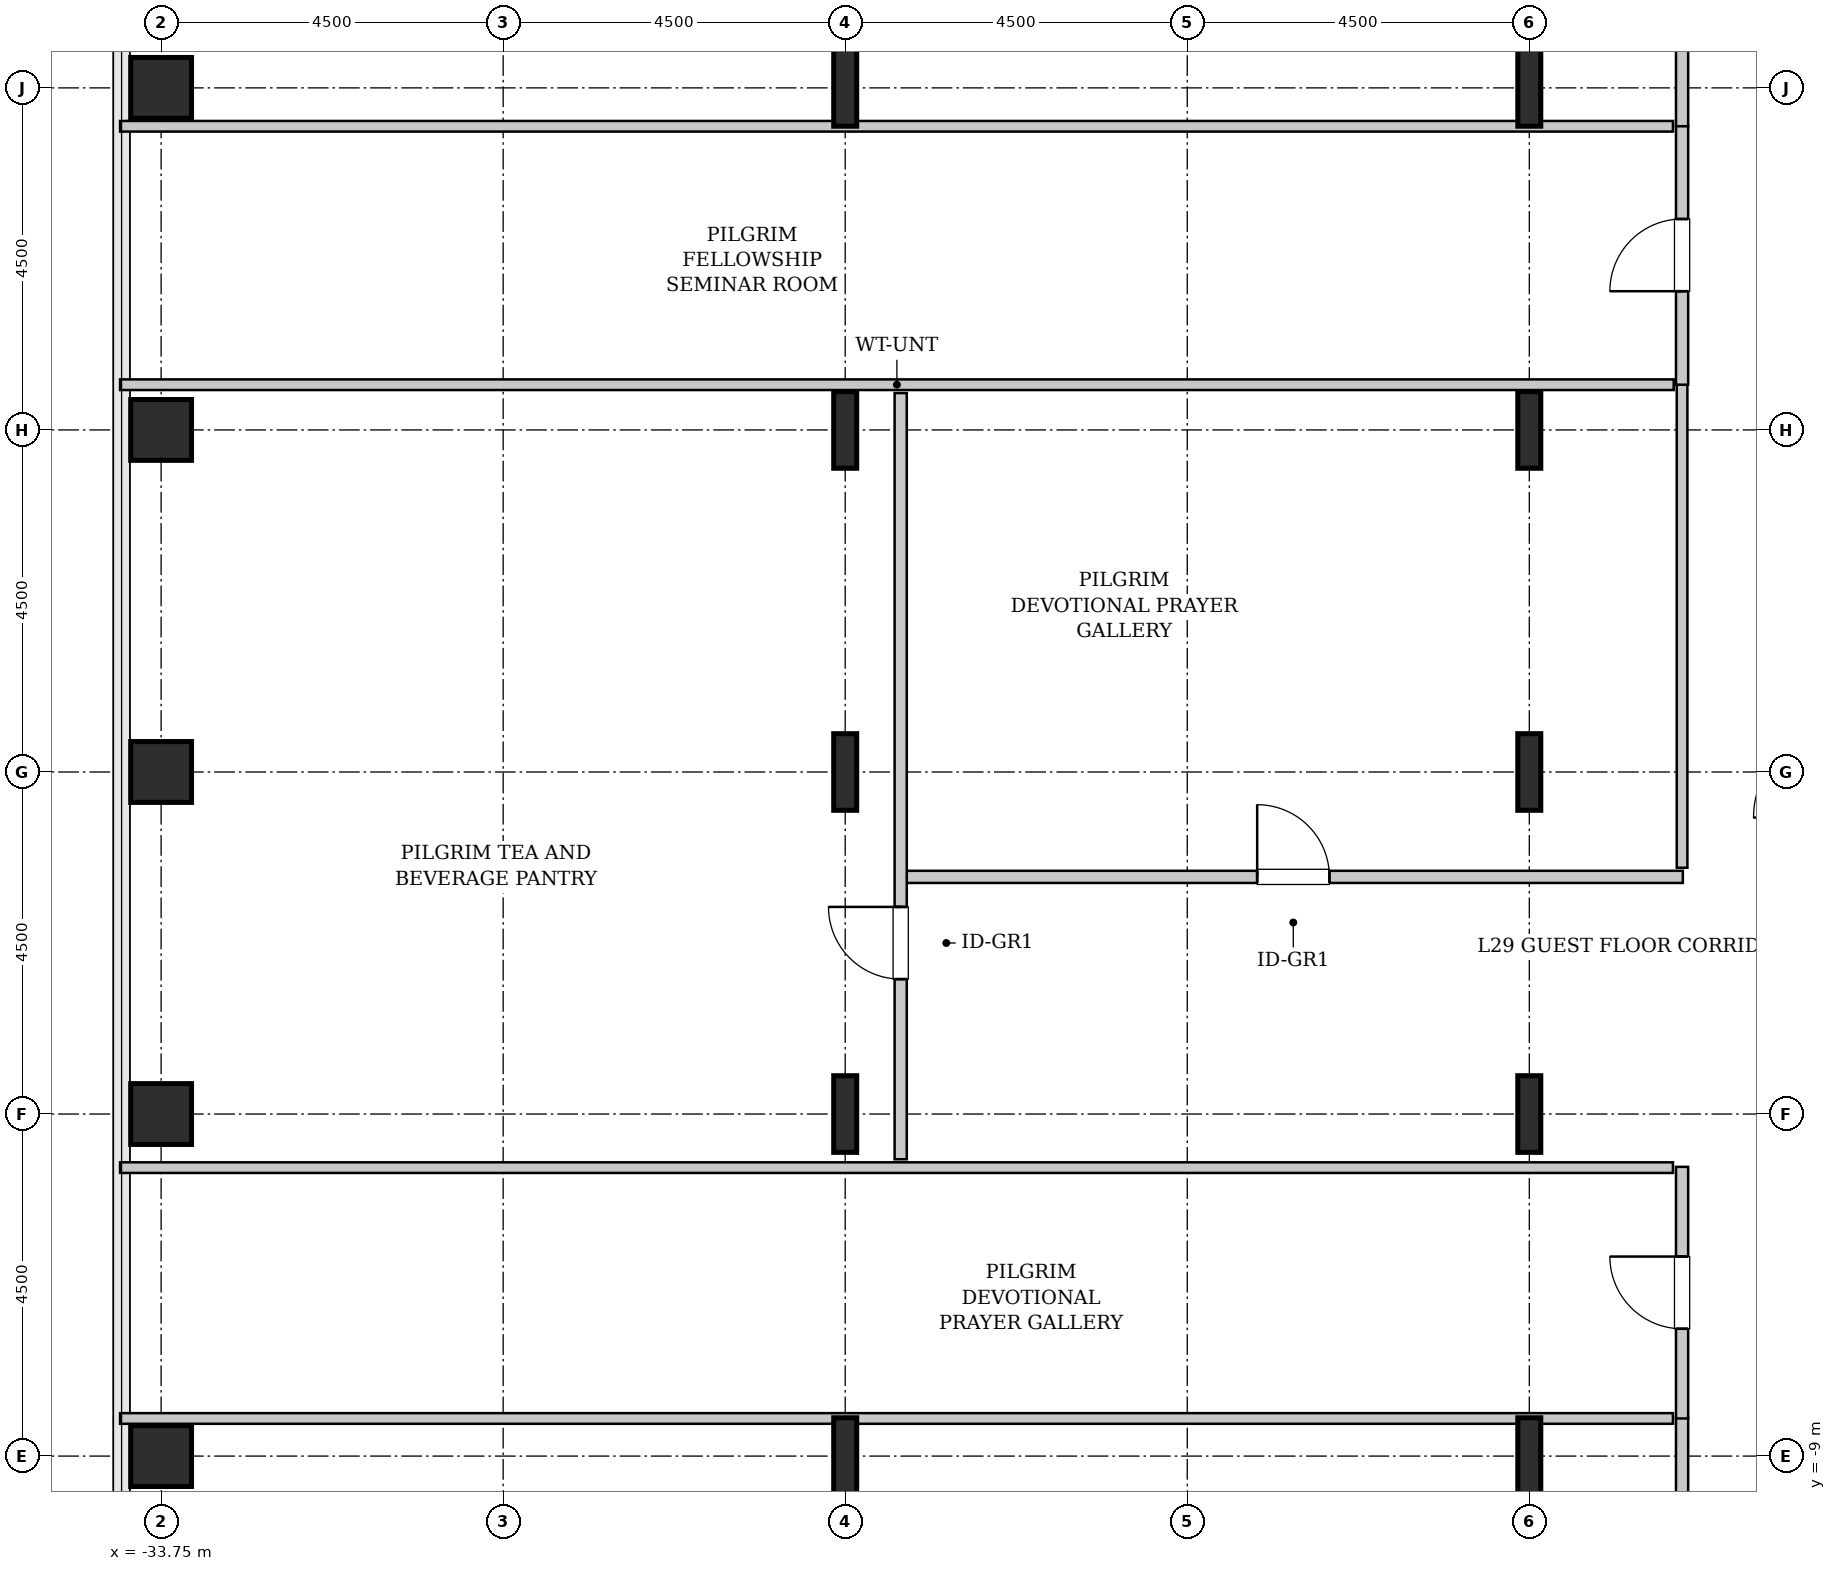
"""IFC4 building model, lengths in metres.
Left out: names, types, materials, properties, quantities, classifications, styles, units other than length and angle.
Written with IfcOpenShell. Run it as: python <this file> out.ifc"""

import sys

from ifc_helpers import new_model, si_unit, direction, frame, frame_2d, origin, origin_2d, place, context, subcontext, project, spatial, rectangle, hollow_rectangle, i_section, extrude, source, transform, mapped, element, fill, save


model = new_model("IFC4")
c1 = context("Model", 3, precision=1e-05, world=origin(), true_north=direction((0.0, 1.0)))
c2 = subcontext(c1, "Body", "Model", "MODEL_VIEW")
j1 = project(units=[si_unit("LENGTHUNIT", "METRE"), si_unit("PLANEANGLEUNIT", "RADIAN")], contexts=[c1])
p1 = place(None, origin())
s1 = spatial("IfcSite", under=j1, at=p1, CompositionType="ELEMENT")
p2 = place(p1, origin())
s2 = spatial("IfcBuilding", under=s1, at=p2, CompositionType="ELEMENT")
p3 = place(p2, frame((0.0, 0.0, 121.2)))
s3 = spatial("IfcBuildingStorey", under=s2, at=p3, CompositionType="ELEMENT", Elevation=121.2)
m1 = source(origin(), c2, "Body", "SweptSolid", [
    extrude(hollow_rectangle(XDim=0.8, YDim=0.8, WallThickness=0.04, InnerFilletRadius=0.04, OuterFilletRadius=0.08, at=origin_2d()), origin(), (0.0, 0.0, 1.0), 3.8),
])
for number, where, z_axis, x_axis in (
    (1, (-33.75, -9.0, 0.0), (0.0, 0.0, 1.0), (1.0, 0.0, 0.0)),
    (2, (-33.75, -4.5, 0.0), (0.0, 0.0, 1.0), (1.0, 0.0, 0.0)),
    (3, (-33.75, 0.0, 0.0), (0.0, 0.0, 1.0), (1.0, 0.0, 0.0)),
    (4, (-33.75, 4.5, 0.0), (0.0, 0.0, 1.0), (1.0, 0.0, 0.0)),
    (5, (-33.75, 9.0, 0.0), (0.0, 0.0, 1.0), (1.0, 0.0, 0.0)),
):
    element("IfcColumn", number, at=place(p3, frame(where, z_axis=z_axis, x_axis=x_axis)), inside=s3, PredefinedType="COLUMN", context=c2, shape_type="MappedRepresentation", body=[
        mapped(m1, transform((0.0, 0.0, 0.0), x_axis=(1.0, 0.0, 0.0), y_axis=(0.0, 1.0, 0.0), z_axis=(0.0, 0.0, 1.0), scale=1.0)),
    ])
m2 = source(origin(), c2, "Body", "SweptSolid", [
    extrude(i_section(OverallWidth=0.302, OverallDepth=1.008, WebThickness=0.021, FlangeThickness=0.04, FilletRadius=0.03, at=origin_2d()), origin(), (0.0, 0.0, 1.0), 3.8),
])
for number, where, z_axis, x_axis in (
    (6, (-24.75, -9.0, 0.0), (0.0, 0.0, 1.0), (1.0, 0.0, 0.0)),
    (7, (-24.75, -4.5, 0.0), (0.0, 0.0, 1.0), (1.0, 0.0, 0.0)),
    (8, (-24.75, 0.0, 0.0), (0.0, 0.0, 1.0), (1.0, 0.0, 0.0)),
    (9, (-24.75, 4.5, 0.0), (0.0, 0.0, 1.0), (1.0, 0.0, 0.0)),
    (10, (-24.75, 9.0, 0.0), (0.0, 0.0, 1.0), (1.0, 0.0, 0.0)),
    (11, (-15.75, -9.0, 0.0), (0.0, 0.0, 1.0), (1.0, 0.0, 0.0)),
    (12, (-15.75, -4.5, 0.0), (0.0, 0.0, 1.0), (1.0, 0.0, 0.0)),
    (13, (-15.75, 0.0, 0.0), (0.0, 0.0, 1.0), (1.0, 0.0, 0.0)),
    (14, (-15.75, 4.5, 0.0), (0.0, 0.0, 1.0), (1.0, 0.0, 0.0)),
    (15, (-15.75, 9.0, 0.0), (0.0, 0.0, 1.0), (1.0, 0.0, 0.0)),
):
    element("IfcColumn", number, at=place(p3, frame(where, z_axis=z_axis, x_axis=x_axis)), inside=s3, PredefinedType="COLUMN", context=c2, shape_type="MappedRepresentation", body=[
        mapped(m2, transform((0.0, 0.0, 0.0), x_axis=(1.0, 0.0, 0.0), y_axis=(0.0, 1.0, 0.0), z_axis=(0.0, 0.0, 1.0), scale=1.0)),
    ])
m3 = source(origin(), c2, "Body", "SweptSolid", [
    extrude(rectangle(XDim=12.745, YDim=0.16, at=frame_2d((6.373, 0.0))), origin(), (0.0, 0.0, 1.0), 3.535),
])
p4 = place(p3, frame((-13.74, -21.24, 0.0), z_axis=(0.0, 0.0, 1.0), x_axis=(0.0, 1.0, 0.0)))
e16 = element("IfcWall", 16, at=p4, inside=s3, PredefinedType="PARTITIONING", context=c2, shape_type="MappedRepresentation", body=[
    mapped(m3, transform((0.0, 0.0, 0.0), x_axis=(1.0, 0.0, 0.0), y_axis=(0.0, 1.0, 0.0), z_axis=(0.0, 0.0, 1.0), scale=1.0)),
])
p5 = place(p4, frame((10.762, 0.0, 0.0)))
e17 = element("IfcOpeningElement", 17, at=p5, cuts=e16, PredefinedType="OPENING", context=c2, shape_type="SweptSolid", body=[
    extrude(rectangle(XDim=0.95, YDim=2.1, at=frame_2d((0.475, 1.05))), frame((0.0, 0.09, 0.0), z_axis=(0.0, -1.0, 0.0), x_axis=(1.0, 0.0, 0.0)), (0.0, 0.0, 1.0), 0.18),
])
m4 = source(origin(), c2, "Body", "SweptSolid", [
    extrude(rectangle(XDim=20.43, YDim=0.14, at=frame_2d((10.215, 0.0))), origin(), (0.0, 0.0, 1.0), 2.875),
])
p6 = place(p3, frame((-34.29, -8.505, 0.0), z_axis=(0.0, 0.0, 1.0), x_axis=(1.0, 0.0, 0.0)))
e18 = element("IfcWall", 18, at=p6, inside=s3, PredefinedType="PARTITIONING", context=c2, shape_type="MappedRepresentation", body=[
    mapped(m4, transform((0.0, 0.0, 0.0), x_axis=(1.0, 0.0, 0.0), y_axis=(0.0, 1.0, 0.0), z_axis=(0.0, 0.0, 1.0), scale=1.0)),
])
m5 = source(origin(), c2, "Body", "SweptSolid", [
    extrude(rectangle(XDim=3.31, YDim=0.16, at=frame_2d((1.655, 0.0))), origin(), (0.0, 0.0, 1.0), 3.535),
])
p7 = place(p3, frame((-13.74, -8.505, 0.0), z_axis=(0.0, 0.0, 1.0), x_axis=(0.0, 1.0, 0.0)))
e19 = element("IfcWall", 19, at=p7, inside=s3, PredefinedType="PARTITIONING", context=c2, shape_type="MappedRepresentation", body=[
    mapped(m5, transform((0.0, 0.0, 0.0), x_axis=(1.0, 0.0, 0.0), y_axis=(0.0, 1.0, 0.0), z_axis=(0.0, 0.0, 1.0), scale=1.0)),
])
p8 = place(p7, frame((1.18, 0.0, 0.0)))
e20 = element("IfcOpeningElement", 20, at=p8, cuts=e19, PredefinedType="OPENING", context=c2, shape_type="SweptSolid", body=[
    extrude(rectangle(XDim=0.95, YDim=2.1, at=frame_2d((0.475, 1.05))), frame((0.0, 0.09, 0.0), z_axis=(0.0, -1.0, 0.0), x_axis=(1.0, 0.0, 0.0)), (0.0, 0.0, 1.0), 0.18),
])
m6 = source(origin(), c2, "Body", "SweptSolid", [
    extrude(rectangle(XDim=20.43, YDim=0.14, at=frame_2d((10.215, 0.0))), origin(), (0.0, 0.0, 1.0), 3.535),
])
p9 = place(p3, frame((-34.29, -5.205, 0.0), z_axis=(0.0, 0.0, 1.0), x_axis=(1.0, 0.0, 0.0)))
e21 = element("IfcWall", 21, at=p9, inside=s3, PredefinedType="PARTITIONING", context=c2, shape_type="MappedRepresentation", body=[
    mapped(m6, transform((0.0, 0.0, 0.0), x_axis=(1.0, 0.0, 0.0), y_axis=(0.0, 1.0, 0.0), z_axis=(0.0, 0.0, 1.0), scale=1.0)),
])
m7 = source(origin(), c2, "Body", "SweptSolid", [
    extrude(rectangle(XDim=10.25, YDim=0.16, at=frame_2d((5.125, 0.0))), origin(), (0.0, 0.0, 1.0), 3.535),
])
p10 = place(p3, frame((-23.98, -1.38, 0.0), z_axis=(0.0, 0.0, 1.0), x_axis=(1.0, 0.0, 0.0)))
e22 = element("IfcWall", 22, at=p10, inside=s3, PredefinedType="PARTITIONING", context=c2, shape_type="MappedRepresentation", body=[
    mapped(m7, transform((0.0, 0.0, 0.0), x_axis=(1.0, 0.0, 0.0), y_axis=(0.0, 1.0, 0.0), z_axis=(0.0, 0.0, 1.0), scale=1.0)),
])
p11 = place(p10, frame((4.65, 0.0, 0.0)))
e23 = element("IfcOpeningElement", 23, at=p11, cuts=e22, PredefinedType="OPENING", context=c2, shape_type="SweptSolid", body=[
    extrude(rectangle(XDim=0.95, YDim=2.1, at=frame_2d((0.475, 1.05))), frame((0.0, 0.09, 0.0), z_axis=(0.0, -1.0, 0.0), x_axis=(1.0, 0.0, 0.0)), (0.0, 0.0, 1.0), 0.18),
])
m8 = source(origin(), c2, "Body", "SweptSolid", [
    extrude(rectangle(XDim=6.365, YDim=0.14, at=frame_2d((3.183, 0.0))), origin(), (0.0, 0.0, 1.0), 3.535),
])
p12 = place(p3, frame((-13.74, -1.26, 0.0), z_axis=(0.0, 0.0, 1.0), x_axis=(0.0, 1.0, 0.0)))
e24 = element("IfcWall", 24, at=p12, inside=s3, PredefinedType="PARTITIONING", context=c2, shape_type="MappedRepresentation", body=[
    mapped(m8, transform((0.0, 0.0, 0.0), x_axis=(1.0, 0.0, 0.0), y_axis=(0.0, 1.0, 0.0), z_axis=(0.0, 0.0, 1.0), scale=1.0)),
])
m9 = source(origin(), c2, "Body", "SweptSolid", [
    extrude(rectangle(XDim=20.44, YDim=0.14, at=frame_2d((10.22, 0.0))), origin(), (0.0, 0.0, 1.0), 3.535),
])
p13 = place(p3, frame((-34.29, 5.095, 0.0), z_axis=(0.0, 0.0, 1.0), x_axis=(1.0, 0.0, 0.0)))
e25 = element("IfcWall", 25, at=p13, inside=s3, PredefinedType="PARTITIONING", context=c2, shape_type="MappedRepresentation", body=[
    mapped(m9, transform((0.0, 0.0, 0.0), x_axis=(1.0, 0.0, 0.0), y_axis=(0.0, 1.0, 0.0), z_axis=(0.0, 0.0, 1.0), scale=1.0)),
])
m10 = source(origin(), c2, "Body", "SweptSolid", [
    extrude(rectangle(XDim=10.08, YDim=0.16, at=frame_2d((5.04, 0.0))), origin(), (0.0, 0.0, 1.0), 3.535),
])
p14 = place(p3, frame((-24.02, -5.095, 0.0), z_axis=(0.0, 0.0, 1.0), x_axis=(0.0, 1.0, 0.0)))
e26 = element("IfcWall", 26, at=p14, inside=s3, PredefinedType="PARTITIONING", context=c2, shape_type="MappedRepresentation", body=[
    mapped(m10, transform((0.0, 0.0, 0.0), x_axis=(1.0, 0.0, 0.0), y_axis=(0.0, 1.0, 0.0), z_axis=(0.0, 0.0, 1.0), scale=1.0)),
])
p15 = place(p14, frame((2.37, 0.0, 0.0)))
e27 = element("IfcOpeningElement", 27, at=p15, cuts=e26, PredefinedType="OPENING", context=c2, shape_type="SweptSolid", body=[
    extrude(rectangle(XDim=0.95, YDim=2.1, at=frame_2d((0.475, 1.05))), frame((0.0, 0.09, 0.0), z_axis=(0.0, -1.0, 0.0), x_axis=(1.0, 0.0, 0.0)), (0.0, 0.0, 1.0), 0.18),
])
m11 = source(origin(), c2, "Body", "SweptSolid", [
    extrude(rectangle(XDim=3.41, YDim=0.16, at=frame_2d((1.705, 0.0))), origin(), (0.0, 0.0, 1.0), 3.535),
])
p16 = place(p3, frame((-13.74, 5.095, 0.0), z_axis=(0.0, 0.0, 1.0), x_axis=(0.0, 1.0, 0.0)))
e28 = element("IfcWall", 28, at=p16, inside=s3, PredefinedType="PARTITIONING", context=c2, shape_type="MappedRepresentation", body=[
    mapped(m11, transform((0.0, 0.0, 0.0), x_axis=(1.0, 0.0, 0.0), y_axis=(0.0, 1.0, 0.0), z_axis=(0.0, 0.0, 1.0), scale=1.0)),
])
p17 = place(p16, frame((1.23, 0.0, 0.0)))
e29 = element("IfcOpeningElement", 29, at=p17, cuts=e28, PredefinedType="OPENING", context=c2, shape_type="SweptSolid", body=[
    extrude(rectangle(XDim=0.95, YDim=2.1, at=frame_2d((0.475, 1.05))), frame((0.0, 0.09, 0.0), z_axis=(0.0, -1.0, 0.0), x_axis=(1.0, 0.0, 0.0)), (0.0, 0.0, 1.0), 0.18),
])
p18 = place(p3, frame((-34.29, 8.495, 0.0), z_axis=(0.0, 0.0, 1.0), x_axis=(1.0, 0.0, 0.0)))
e30 = element("IfcWall", 30, at=p18, inside=s3, PredefinedType="PARTITIONING", context=c2, shape_type="MappedRepresentation", body=[
    mapped(m4, transform((0.0, 0.0, 0.0), x_axis=(1.0, 0.0, 0.0), y_axis=(0.0, 1.0, 0.0), z_axis=(0.0, 0.0, 1.0), scale=1.0)),
])
p19 = place(p3, frame((-13.74, 8.495, 0.0), z_axis=(0.0, 0.0, 1.0), x_axis=(0.0, 1.0, 0.0)))
e31 = element("IfcWall", 31, at=p19, inside=s3, PredefinedType="PARTITIONING", context=c2, shape_type="MappedRepresentation", body=[
    mapped(m3, transform((0.0, 0.0, 0.0), x_axis=(1.0, 0.0, 0.0), y_axis=(0.0, 1.0, 0.0), z_axis=(0.0, 0.0, 1.0), scale=1.0)),
])
p20 = place(p19, frame((1.032, 0.0, 0.0)))
e32 = element("IfcOpeningElement", 32, at=p20, cuts=e31, PredefinedType="OPENING", context=c2, shape_type="SweptSolid", body=[
    extrude(rectangle(XDim=0.95, YDim=2.1, at=frame_2d((0.475, 1.05))), frame((0.0, 0.09, 0.0), z_axis=(0.0, -1.0, 0.0), x_axis=(1.0, 0.0, 0.0)), (0.0, 0.0, 1.0), 0.18),
])
m12 = source(origin(), c2, "Body", "SweptSolid", [
    extrude(rectangle(XDim=0.95, YDim=2.1, at=frame_2d((0.475, 1.05))), frame((0.0, 0.025, 0.0), z_axis=(0.0, -1.0, 0.0), x_axis=(1.0, 0.0, 0.0)), (0.0, 0.0, 1.0), 0.05),
])
p21 = place(p8, origin())
e33 = element("IfcDoor", 33, at=p21, inside=s3, OperationType="SINGLE_SWING_RIGHT", PredefinedType="DOOR", context=c2, shape_type="MappedRepresentation", body=[
    mapped(m12, transform((0.0, 0.0, 0.0), x_axis=(1.0, 0.0, 0.0), y_axis=(0.0, 1.0, 0.0), z_axis=(0.0, 0.0, 1.0), scale=1.0)),
])
fill(e20, e33)
p22 = place(p11, origin())
e34 = element("IfcDoor", 34, at=p22, inside=s3, OperationType="SINGLE_SWING_LEFT", PredefinedType="DOOR", context=c2, shape_type="MappedRepresentation", body=[
    mapped(m12, transform((0.0, 0.0, 0.0), x_axis=(1.0, 0.0, 0.0), y_axis=(0.0, 1.0, 0.0), z_axis=(0.0, 0.0, 1.0), scale=1.0)),
])
fill(e23, e34)
p23 = place(p15, origin())
e35 = element("IfcDoor", 35, at=p23, inside=s3, OperationType="SINGLE_SWING_RIGHT", PredefinedType="DOOR", context=c2, shape_type="MappedRepresentation", body=[
    mapped(m12, transform((0.0, 0.0, 0.0), x_axis=(1.0, 0.0, 0.0), y_axis=(0.0, 1.0, 0.0), z_axis=(0.0, 0.0, 1.0), scale=1.0)),
])
fill(e27, e35)
p24 = place(p17, origin())
e36 = element("IfcDoor", 36, at=p24, inside=s3, OperationType="SINGLE_SWING_LEFT", PredefinedType="DOOR", context=c2, shape_type="MappedRepresentation", body=[
    mapped(m12, transform((0.0, 0.0, 0.0), x_axis=(1.0, 0.0, 0.0), y_axis=(0.0, 1.0, 0.0), z_axis=(0.0, 0.0, 1.0), scale=1.0)),
])
fill(e29, e36)
save(model, sys.argv[1])
